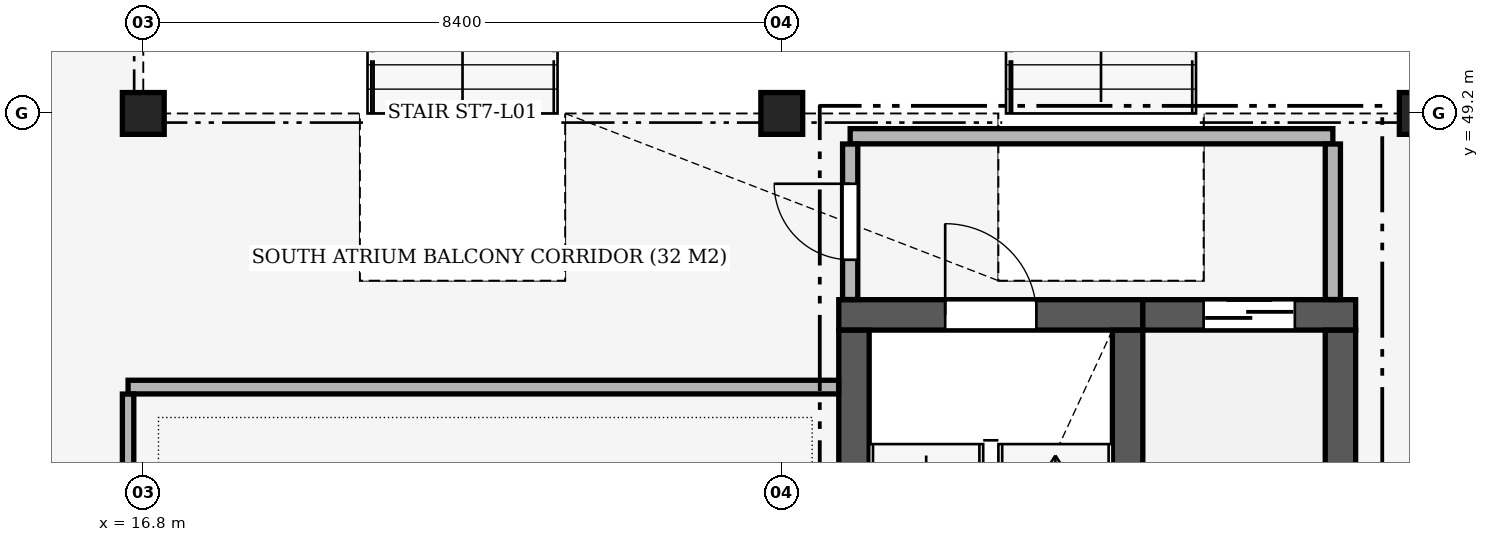
"""IFC4 building model, lengths in metres.
Left out: names, types, materials, properties, quantities, classifications, styles, units other than length and angle.
Written with IfcOpenShell. Run it as: python <this file> out.ifc"""

import sys

from ifc_helpers import new_model, si_unit, direction, frame, frame_2d, origin, origin_2d, place, context, subcontext, project, spatial, rectangle, extrude, element, fill, save


model = new_model("IFC4")
c1 = context("Model", 3, precision=1e-05, world=origin(), true_north=direction((0.0, 1.0)))
c2 = subcontext(c1, "Body", "Model", "MODEL_VIEW")
j1 = project(units=[si_unit("LENGTHUNIT", "METRE"), si_unit("PLANEANGLEUNIT", "RADIAN")], contexts=[c1])
p1 = place(None, origin())
s1 = spatial("IfcSite", under=j1, at=p1, CompositionType="ELEMENT")
p2 = place(p1, origin())
s2 = spatial("IfcBuilding", under=s1, at=p2, CompositionType="ELEMENT")
p3 = place(p2, frame((0.0, 0.0, 5.1)))
s3 = spatial("IfcBuildingStorey", under=s2, at=p3, CompositionType="ELEMENT", Elevation=5.1)
for number, where, z_axis, x_axis in (
    (1, (16.8, 49.2, 0.0), (0.0, 0.0, 1.0), (1.0, 0.0, 0.0)),
    (2, (25.2, 49.2, 0.0), (0.0, 0.0, 1.0), (1.0, 0.0, 0.0)),
    (3, (33.6, 49.2, 0.0), (0.0, 0.0, 1.0), (1.0, 0.0, 0.0)),
):
    element("IfcColumn", number, at=place(p3, frame(where, z_axis=z_axis, x_axis=x_axis)), inside=s3, PredefinedType="COLUMN", context=c2, shape_type="SweptSolid", body=[
        extrude(rectangle(XDim=0.55, YDim=0.55, at=origin_2d()), origin(), (0.0, 0.0, 1.0), 5.1),
    ])
p4 = place(p3, frame((25.95, 46.55, 0.0), z_axis=(0.0, 0.0, 1.0), x_axis=(1.0, 0.0, 0.0)))
e4 = element("IfcWall", 4, at=p4, inside=s3, PredefinedType="SHEAR", context=c2, shape_type="SweptSolid", body=[
    extrude(rectangle(XDim=4.0, YDim=0.4, at=frame_2d((2.0, 0.0))), origin(), (0.0, 0.0, 1.0), 4.82),
])
p5 = place(p4, frame((1.4, 0.0, 0.0)))
e5 = element("IfcOpeningElement", 5, at=p5, cuts=e4, PredefinedType="OPENING", context=c2, shape_type="SweptSolid", body=[
    extrude(rectangle(XDim=1.2, YDim=2.2, at=frame_2d((0.6, 1.1))), frame((0.0, 0.215, 0.0), z_axis=(0.0, -1.0, 0.0), x_axis=(1.0, 0.0, 0.0)), (0.0, 0.0, 1.0), 0.43),
])
for number, where, z_axis, x_axis in (
    (6, (26.15, 39.452, 0.0), (0.0, 0.0, 1.0), (0.0, 1.0, 0.0)),
    (7, (29.75, 39.452, 0.0), (0.0, 0.0, 1.0), (0.0, 1.0, 0.0)),
):
    element("IfcWall", number, at=place(p3, frame(where, z_axis=z_axis, x_axis=x_axis)), inside=s3, PredefinedType="SHEAR", context=c2, shape_type="SweptSolid", body=[
        extrude(rectangle(XDim=6.896, YDim=0.4, at=frame_2d((3.448, 0.0))), origin(), (0.0, 0.0, 1.0), 4.82),
    ])
p6 = place(p3, frame((29.95, 46.55, 0.0), z_axis=(0.0, 0.0, 1.0), x_axis=(1.0, 0.0, 0.0)))
e8 = element("IfcWall", 8, at=p6, inside=s3, PredefinedType="SHEAR", context=c2, shape_type="SweptSolid", body=[
    extrude(rectangle(XDim=2.8, YDim=0.4, at=frame_2d((1.4, 0.0))), origin(), (0.0, 0.0, 1.0), 4.82),
])
p7 = place(p6, frame((0.8, 0.0, 0.0)))
e9 = element("IfcOpeningElement", 9, at=p7, cuts=e8, PredefinedType="OPENING", context=c2, shape_type="SweptSolid", body=[
    extrude(rectangle(XDim=1.2, YDim=2.15, at=frame_2d((0.6, 1.075))), frame((0.0, 0.215, 0.0), z_axis=(0.0, -1.0, 0.0), x_axis=(1.0, 0.0, 0.0)), (0.0, 0.0, 1.0), 0.43),
])
p8 = place(p3, frame((32.55, 43.552, 0.0), z_axis=(0.0, 0.0, 1.0), x_axis=(0.0, 1.0, 0.0)))
e10 = element("IfcWall", 10, at=p8, inside=s3, PredefinedType="SHEAR", context=c2, shape_type="SweptSolid", body=[
    extrude(rectangle(XDim=2.796, YDim=0.4, at=frame_2d((1.398, 0.0))), origin(), (0.0, 0.0, 1.0), 4.82),
])
p9 = place(p3, frame((16.6, 45.6, 0.0), z_axis=(0.0, 0.0, 1.0), x_axis=(1.0, 0.0, 0.0)))
e11 = element("IfcWall", 11, at=p9, inside=s3, PredefinedType="PARTITIONING", context=c2, shape_type="SweptSolid", body=[
    extrude(rectangle(XDim=9.348, YDim=0.18, at=frame_2d((4.674, 0.0))), origin(), (0.0, 0.0, 1.0), 4.02),
])
p10 = place(p3, frame((26.1, 48.9, 0.0), z_axis=(0.0, 0.0, 1.0), x_axis=(1.0, 0.0, 0.0)))
e12 = element("IfcWall", 12, at=p10, inside=s3, PredefinedType="PARTITIONING", context=c2, shape_type="SweptSolid", body=[
    extrude(rectangle(XDim=6.35, YDim=0.2, at=frame_2d((3.175, 0.0))), origin(), (0.0, 0.0, 1.0), 4.07),
])
p11 = place(p3, frame((16.6, 35.4, 0.0), z_axis=(0.0, 0.0, 1.0), x_axis=(0.0, 1.0, 0.0)))
e13 = element("IfcWall", 13, at=p11, inside=s3, PredefinedType="PARTITIONING", context=c2, shape_type="SweptSolid", body=[
    extrude(rectangle(XDim=10.108, YDim=0.15, at=frame_2d((5.054, 0.0))), origin(), (0.0, 0.0, 1.0), 4.02),
])
p12 = place(p11, frame((2.254, 0.0, 0.0)))
e14 = element("IfcOpeningElement", 14, at=p12, cuts=e13, PredefinedType="OPENING", context=c2, shape_type="SweptSolid", body=[
    extrude(rectangle(XDim=1.6, YDim=2.3, at=frame_2d((0.8, 1.15))), frame((0.0, 0.09, 0.0), z_axis=(0.0, -1.0, 0.0), x_axis=(1.0, 0.0, 0.0)), (0.0, 0.0, 1.0), 0.18),
])
p13 = place(p3, frame((26.1, 46.752, 0.0), z_axis=(0.0, 0.0, 1.0), x_axis=(0.0, 1.0, 0.0)))
e15 = element("IfcWall", 15, at=p13, inside=s3, PredefinedType="PARTITIONING", context=c2, shape_type="SweptSolid", body=[
    extrude(rectangle(XDim=2.046, YDim=0.2, at=frame_2d((1.023, 0.0))), origin(), (0.0, 0.0, 1.0), 4.27),
])
p14 = place(p13, frame((0.523, 0.0, 0.0)))
e16 = element("IfcOpeningElement", 16, at=p14, cuts=e15, PredefinedType="OPENING", context=c2, shape_type="SweptSolid", body=[
    extrude(rectangle(XDim=1.0, YDim=2.1, at=frame_2d((0.5, 1.05))), frame((0.0, 0.115, 0.0), z_axis=(0.0, -1.0, 0.0), x_axis=(1.0, 0.0, 0.0)), (0.0, 0.0, 1.0), 0.23),
])
p15 = place(p3, frame((32.45, 46.752, 0.0), z_axis=(0.0, 0.0, 1.0), x_axis=(0.0, 1.0, 0.0)))
e17 = element("IfcWall", 17, at=p15, inside=s3, PredefinedType="PARTITIONING", context=c2, shape_type="SweptSolid", body=[
    extrude(rectangle(XDim=2.046, YDim=0.2, at=frame_2d((1.023, 0.0))), origin(), (0.0, 0.0, 1.0), 4.27),
])
p16 = place(p5, origin())
e18 = element("IfcDoor", 18, at=p16, inside=s3, OperationType="SINGLE_SWING_LEFT", PredefinedType="DOOR", context=c2, shape_type="SweptSolid", body=[
    extrude(rectangle(XDim=1.2, YDim=2.2, at=frame_2d((0.6, 1.1))), frame((0.0, 0.025, 0.0), z_axis=(0.0, -1.0, 0.0), x_axis=(1.0, 0.0, 0.0)), (0.0, 0.0, 1.0), 0.05),
])
fill(e5, e18)
p17 = place(p7, origin())
e19 = element("IfcDoor", 19, at=p17, inside=s3, OperationType="DOUBLE_DOOR_SLIDING", PredefinedType="DOOR", context=c2, shape_type="SweptSolid", body=[
    extrude(rectangle(XDim=1.2, YDim=2.15, at=frame_2d((0.6, 1.075))), frame((0.0, 0.025, 0.0), z_axis=(0.0, -1.0, 0.0), x_axis=(1.0, 0.0, 0.0)), (0.0, 0.0, 1.0), 0.05),
])
fill(e9, e19)
p18 = place(p14, origin())
e20 = element("IfcDoor", 20, at=p18, inside=s3, OperationType="SINGLE_SWING_RIGHT", PredefinedType="DOOR", context=c2, shape_type="SweptSolid", body=[
    extrude(rectangle(XDim=1.0, YDim=2.1, at=frame_2d((0.5, 1.05))), frame((0.0, 0.025, 0.0), z_axis=(0.0, -1.0, 0.0), x_axis=(1.0, 0.0, 0.0)), (0.0, 0.0, 1.0), 0.05),
])
fill(e16, e20)
save(model, sys.argv[1])
